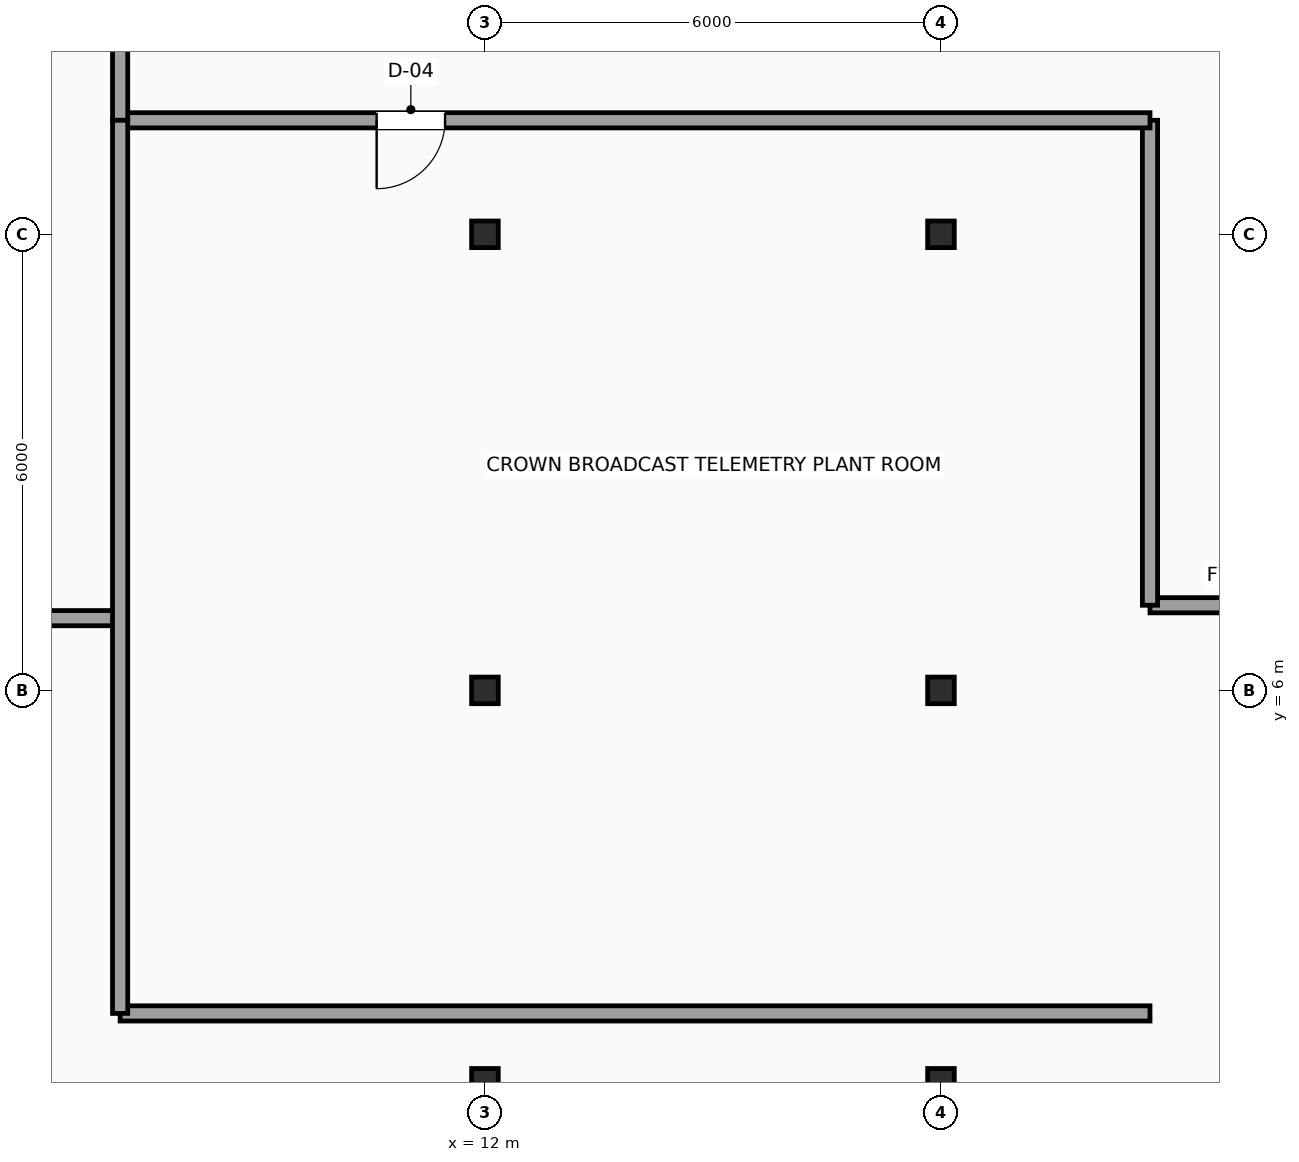
"""IFC4 building model, lengths in metres.
Left out: names, types, materials, properties, quantities, classifications, styles, units other than length and angle.
Written with IfcOpenShell. Run it as: python <this file> out.ifc"""

import sys

from ifc_helpers import new_model, si_unit, direction, frame, frame_2d, origin, origin_2d, place, context, subcontext, project, spatial, rectangle, hollow_rectangle, extrude, element, fill, save


model = new_model("IFC4")
c1 = context("Model", 3, precision=1e-05, world=origin(), true_north=direction((0.0, 1.0)))
c2 = subcontext(c1, "Body", "Model", "MODEL_VIEW")
j1 = project(units=[si_unit("LENGTHUNIT", "METRE"), si_unit("PLANEANGLEUNIT", "RADIAN")], contexts=[c1])
p1 = place(None, origin())
s1 = spatial("IfcSite", under=j1, at=p1, CompositionType="ELEMENT")
p2 = place(p1, origin())
s2 = spatial("IfcBuilding", under=s1, at=p2, CompositionType="ELEMENT")
p3 = place(p2, frame((0.0, 0.0, 300.9)))
s3 = spatial("IfcBuildingStorey", under=s2, at=p3, CompositionType="ELEMENT", Elevation=300.9)
for number, where, z_axis, x_axis in (
    (1, (12.0, 0.85, 0.0), (0.0, 0.0, 1.0), (1.0, 0.0, 0.0)),
    (2, (12.0, 6.0, 0.0), (0.0, 0.0, 1.0), (1.0, 0.0, 0.0)),
    (3, (12.0, 12.0, 0.0), (0.0, 0.0, 1.0), (1.0, 0.0, 0.0)),
    (4, (18.0, 0.85, 0.0), (0.0, 0.0, 1.0), (1.0, 0.0, 0.0)),
    (5, (18.0, 6.0, 0.0), (0.0, 0.0, 1.0), (1.0, 0.0, 0.0)),
    (6, (18.0, 12.0, 0.0), (0.0, 0.0, 1.0), (1.0, 0.0, 0.0)),
):
    element("IfcColumn", number, at=place(p3, frame(where, z_axis=z_axis, x_axis=x_axis)), inside=s3, PredefinedType="COLUMN", context=c2, shape_type="SweptSolid", body=[
        extrude(hollow_rectangle(XDim=0.35, YDim=0.35, WallThickness=0.016, InnerFilletRadius=0.016, OuterFilletRadius=0.032, at=origin_2d()), origin(), (0.0, 0.0, 1.0), 4.8),
    ])
p4 = place(p3, frame((23.98, 7.12, 0.0), z_axis=(0.0, 0.0, 1.0), x_axis=(-1.0, 0.0, 0.0)))
e7 = element("IfcWall", 7, at=p4, inside=s3, PredefinedType="SOLIDWALL", context=c2, shape_type="SweptSolid", body=[
    extrude(rectangle(XDim=3.23, YDim=0.2, at=frame_2d((1.615, 0.0))), origin(), (0.0, 0.0, 1.0), 4.525),
])
p5 = place(p3, frame((20.75, 7.12, 0.0), z_axis=(0.0, 0.0, 1.0), x_axis=(0.0, 1.0, 0.0)))
e8 = element("IfcWall", 8, at=p5, inside=s3, PredefinedType="SOLIDWALL", context=c2, shape_type="SweptSolid", body=[
    extrude(rectangle(XDim=6.38, YDim=0.2, at=frame_2d((3.19, 0.0))), origin(), (0.0, 0.0, 1.0), 4.525),
])
p6 = place(p3, frame((20.75, 13.5, 0.0), z_axis=(0.0, 0.0, 1.0), x_axis=(-1.0, 0.0, 0.0)))
e9 = element("IfcWall", 9, at=p6, inside=s3, PredefinedType="SOLIDWALL", context=c2, shape_type="SweptSolid", body=[
    extrude(rectangle(XDim=13.55, YDim=0.2, at=frame_2d((6.775, 0.0))), origin(), (0.0, 0.0, 1.0), 4.525),
])
p7 = place(p6, frame((9.275, 0.0, 0.0)))
e10 = element("IfcOpeningElement", 10, at=p7, cuts=e9, PredefinedType="OPENING", context=c2, shape_type="SweptSolid", body=[
    extrude(rectangle(XDim=0.9, YDim=2.15, at=frame_2d((0.45, 1.075))), frame((0.0, 0.11, 0.0), z_axis=(0.0, -1.0, 0.0), x_axis=(1.0, 0.0, 0.0)), (0.0, 0.0, 1.0), 0.22),
])
p8 = place(p3, frame((7.2, 13.5, 0.0), z_axis=(0.0, 0.0, 1.0), x_axis=(0.0, 1.0, 0.0)))
e11 = element("IfcWall", 11, at=p8, inside=s3, PredefinedType="SOLIDWALL", context=c2, shape_type="SweptSolid", body=[
    extrude(rectangle(XDim=2.95, YDim=0.2, at=frame_2d((1.475, 0.0))), origin(), (0.0, 0.0, 1.0), 4.525),
])
p9 = place(p8, frame((0.975, 0.0, 0.0)))
e12 = element("IfcOpeningElement", 12, at=p9, cuts=e11, PredefinedType="OPENING", context=c2, shape_type="SweptSolid", body=[
    extrude(rectangle(XDim=0.9, YDim=2.15, at=frame_2d((0.45, 1.075))), frame((0.0, 0.11, 0.0), z_axis=(0.0, -1.0, 0.0), x_axis=(1.0, 0.0, 0.0)), (0.0, 0.0, 1.0), 0.22),
])
p10 = place(p3, frame((0.85, 6.95, 0.0), z_axis=(0.0, 0.0, 1.0), x_axis=(1.0, 0.0, 0.0)))
e13 = element("IfcWall", 13, at=p10, inside=s3, PredefinedType="SOLIDWALL", context=c2, shape_type="SweptSolid", body=[
    extrude(rectangle(XDim=6.35, YDim=0.2, at=frame_2d((3.175, 0.0))), origin(), (0.0, 0.0, 1.0), 4.525),
])
p11 = place(p3, frame((7.2, 1.75, 0.0), z_axis=(0.0, 0.0, 1.0), x_axis=(1.0, 0.0, 0.0)))
e14 = element("IfcWall", 14, at=p11, inside=s3, PredefinedType="SOLIDWALL", context=c2, shape_type="SweptSolid", body=[
    extrude(rectangle(XDim=13.55, YDim=0.2, at=frame_2d((6.775, 0.0))), origin(), (0.0, 0.0, 1.0), 4.525),
])
p12 = place(p3, frame((7.2, 1.75, 0.0), z_axis=(0.0, 0.0, 1.0), x_axis=(0.0, 1.0, 0.0)))
e15 = element("IfcWall", 15, at=p12, inside=s3, PredefinedType="SOLIDWALL", context=c2, shape_type="SweptSolid", body=[
    extrude(rectangle(XDim=11.75, YDim=0.2, at=frame_2d((5.875, 0.0))), origin(), (0.0, 0.0, 1.0), 4.525),
])
p13 = place(p7, origin())
e16 = element("IfcDoor", 16, at=p13, inside=s3, OperationType="SINGLE_SWING_RIGHT", PredefinedType="DOOR", context=c2, shape_type="SweptSolid", body=[
    extrude(rectangle(XDim=0.9, YDim=2.15, at=frame_2d((0.45, 1.075))), frame((0.0, 0.025, 0.0), z_axis=(0.0, -1.0, 0.0), x_axis=(1.0, 0.0, 0.0)), (0.0, 0.0, 1.0), 0.05),
])
fill(e10, e16)
save(model, sys.argv[1])
